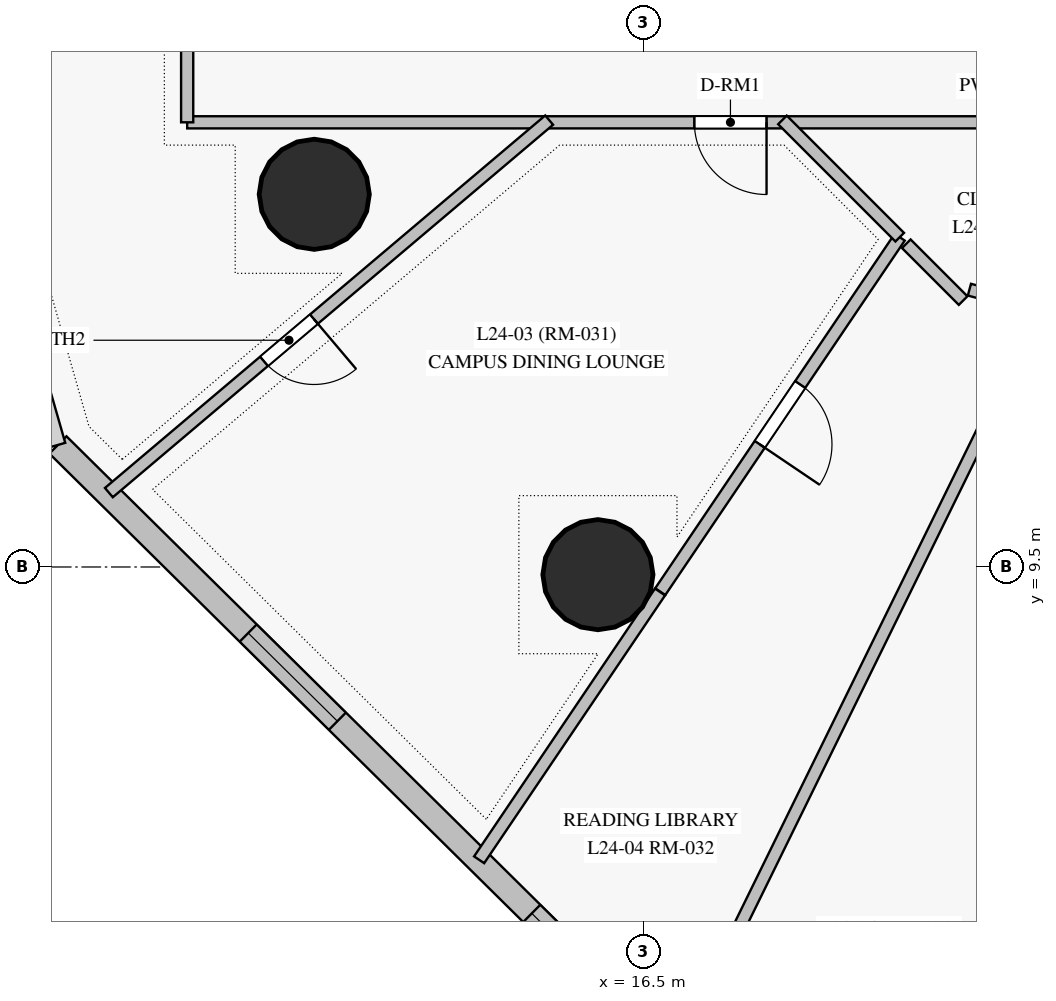
"""IFC4 building model, lengths in metres.
Left out: names, types, materials, properties, quantities, classifications, styles, units other than length and angle.
Written with IfcOpenShell. Run it as: python <this file> out.ifc"""

import sys

from ifc_helpers import new_model, si_unit, direction, frame, frame_2d, origin, origin_with_axes, origin_2d, place, context, subcontext, project, spatial, rectangle, circle, extrude, source, transform, mapped, element, fill, save


model = new_model("IFC4")
c1 = context("Model", 3, precision=1e-05, world=origin(), true_north=direction((0.0, 1.0)))
c2 = subcontext(c1, "Body", "Model", "MODEL_VIEW")
j1 = project(units=[si_unit("LENGTHUNIT", "METRE"), si_unit("PLANEANGLEUNIT", "RADIAN")], contexts=[c1])
p1 = place(None, origin())
s1 = spatial("IfcSite", under=j1, at=p1, CompositionType="ELEMENT")
p2 = place(p1, origin())
s2 = spatial("IfcBuilding", under=s1, at=p2, CompositionType="ELEMENT")
p3 = place(p2, frame((0.0, 0.0, 92.2)))
s3 = spatial("IfcBuildingStorey", under=s2, at=p3, CompositionType="ELEMENT", Elevation=92.2)
m1 = source(origin_with_axes(), c2, "Body", "SweptSolid", [
    extrude(circle(Radius=0.725, at=origin_2d()), origin(), (0.0, 0.0, 1.0), 4.0),
])
for number, where, z_axis, x_axis in (
    (1, (12.172, 14.403, 0.0), (0.0, 0.0, 1.0), (1.0, 0.0, 0.0)),
    (2, (15.904, 9.399, 0.0), (0.0, 0.0, 1.0), (1.0, 0.0, 0.0)),
):
    element("IfcColumn", number, at=place(p3, frame(where, z_axis=z_axis, x_axis=x_axis)), inside=s3, PredefinedType="COLUMN", context=c2, shape_type="MappedRepresentation", body=[
        mapped(m1, transform((0.0, 0.0, 0.0), scale=1.0)),
    ])
p4 = place(p3, frame((8.8, 11.106, 0.0), z_axis=(0.0, 0.0, 1.0), x_axis=(0.711166138023, -0.703023985459, 0.0)))
e3 = element("IfcWall", 3, at=p4, inside=s3, PredefinedType="SOLIDWALL", context=c2, shape_type="SweptSolid", body=[
    extrude(rectangle(XDim=12.474, YDim=0.32, at=frame_2d((6.237, 0.0))), origin(), (0.0, 0.0, 1.0), 3.775),
])
p5 = place(p4, frame((3.52, 0.0, 0.85)))
e4 = element("IfcOpeningElement", 4, at=p5, cuts=e3, PredefinedType="OPENING", context=c2, shape_type="SweptSolid", body=[
    extrude(rectangle(XDim=1.65, YDim=1.65, at=frame_2d((0.825, 0.825))), frame((0.0, 0.17, 0.0), z_axis=(0.0, -1.0, 0.0), x_axis=(1.0, 0.0, 0.0)), (0.0, 0.0, 1.0), 0.34),
])
p6 = place(p4, frame((8.766, 0.0, 0.85)))
e5 = element("IfcOpeningElement", 5, at=p6, cuts=e3, PredefinedType="OPENING", context=c2, shape_type="SweptSolid", body=[
    extrude(rectangle(XDim=1.65, YDim=1.65, at=frame_2d((0.825, 0.825))), frame((0.0, 0.17, 0.0), z_axis=(0.0, -1.0, 0.0), x_axis=(1.0, 0.0, 0.0)), (0.0, 0.0, 1.0), 0.34),
])
p7 = place(p3, frame((40.25, 15.35, 0.0), z_axis=(0.0, 0.0, 1.0), x_axis=(-1.0, 0.0, 0.0)))
e6 = element("IfcWall", 6, at=p7, inside=s3, PredefinedType="PARTITIONING", context=c2, shape_type="SweptSolid", body=[
    extrude(rectangle(XDim=29.75, YDim=0.16, at=frame_2d((14.875, 0.0))), origin(), (0.0, 0.0, 1.0), 2.975),
])
p8 = place(p7, frame((22.127, 0.0, 0.0)))
e7 = element("IfcOpeningElement", 7, at=p8, cuts=e6, PredefinedType="OPENING", context=c2, shape_type="SweptSolid", body=[
    extrude(rectangle(XDim=0.95, YDim=2.15, at=frame_2d((0.475, 1.075))), frame((0.0, 0.09, 0.0), z_axis=(0.0, -1.0, 0.0), x_axis=(1.0, 0.0, 0.0)), (0.0, 0.0, 1.0), 0.18),
])
p9 = place(p7, frame((14.4, 0.0, 0.0)))
e8 = element("IfcOpeningElement", 8, at=p9, cuts=e6, PredefinedType="OPENING", context=c2, shape_type="SweptSolid", body=[
    extrude(rectangle(XDim=0.96, YDim=2.15, at=frame_2d((0.48, 1.075))), frame((0.0, 0.09, 0.0), z_axis=(0.0, -1.0, 0.0), x_axis=(1.0, 0.0, 0.0)), (0.0, 0.0, 1.0), 0.18),
])
p10 = place(p7, frame((10.177, 0.0, 0.0)))
e9 = element("IfcOpeningElement", 9, at=p10, cuts=e6, PredefinedType="OPENING", context=c2, shape_type="SweptSolid", body=[
    extrude(rectangle(XDim=0.96, YDim=2.15, at=frame_2d((0.48, 1.075))), frame((0.0, 0.09, 0.0), z_axis=(0.0, -1.0, 0.0), x_axis=(1.0, 0.0, 0.0)), (0.0, 0.0, 1.0), 0.18),
])
p11 = place(p7, frame((8.254, 0.0, 0.0)))
e10 = element("IfcOpeningElement", 10, at=p11, cuts=e6, PredefinedType="OPENING", context=c2, shape_type="SweptSolid", body=[
    extrude(rectangle(XDim=0.95, YDim=2.15, at=frame_2d((0.475, 1.075))), frame((0.0, 0.09, 0.0), z_axis=(0.0, -1.0, 0.0), x_axis=(1.0, 0.0, 0.0)), (0.0, 0.0, 1.0), 0.18),
])
p12 = place(p7, frame((3.417, 0.0, 0.0)))
e11 = element("IfcOpeningElement", 11, at=p12, cuts=e6, PredefinedType="OPENING", context=c2, shape_type="SweptSolid", body=[
    extrude(rectangle(XDim=0.96, YDim=2.15, at=frame_2d((0.48, 1.075))), frame((0.0, 0.09, 0.0), z_axis=(0.0, -1.0, 0.0), x_axis=(1.0, 0.0, 0.0)), (0.0, 0.0, 1.0), 0.18),
])
p13 = place(p3, frame((10.5, 15.35, 0.0), z_axis=(0.0, 0.0, 1.0), x_axis=(0.0, 1.0, 0.0)))
e12 = element("IfcWall", 12, at=p13, inside=s3, PredefinedType="PARTITIONING", context=c2, shape_type="SweptSolid", body=[
    extrude(rectangle(XDim=16.651, YDim=0.16, at=frame_2d((8.326, 0.0))), origin(), (0.0, 0.0, 1.0), 3.445),
])
p14 = place(p13, frame((11.519, 0.0, 0.0)))
e13 = element("IfcOpeningElement", 13, at=p14, cuts=e12, PredefinedType="OPENING", context=c2, shape_type="SweptSolid", body=[
    extrude(rectangle(XDim=0.95, YDim=2.15, at=frame_2d((0.475, 1.075))), frame((0.0, 0.09, 0.0), z_axis=(0.0, -1.0, 0.0), x_axis=(1.0, 0.0, 0.0)), (0.0, 0.0, 1.0), 0.18),
])
p15 = place(p13, frame((12.642, 0.0, 0.0)))
e14 = element("IfcOpeningElement", 14, at=p15, cuts=e12, PredefinedType="OPENING", context=c2, shape_type="SweptSolid", body=[
    extrude(rectangle(XDim=0.96, YDim=2.15, at=frame_2d((0.48, 1.075))), frame((0.0, 0.09, 0.0), z_axis=(0.0, -1.0, 0.0), x_axis=(1.0, 0.0, 0.0)), (0.0, 0.0, 1.0), 0.18),
])
p16 = place(p3, frame((21.681, 12.744, 0.0), z_axis=(0.0, 0.0, 1.0), x_axis=(-0.440615293115, -0.897696030666, 0.0)))
e15 = element("IfcWall", 15, at=p16, inside=s3, PredefinedType="PARTITIONING", context=c2, shape_type="SweptSolid", body=[
    extrude(rectangle(XDim=10.75, YDim=0.16, at=frame_2d((5.375, 0.0))), origin(), (0.0, 0.0, 1.0), 3.775),
])
p17 = place(p3, frame((15.262, 15.379, 0.0), z_axis=(0.0, 0.0, 1.0), x_axis=(-0.763431442255, -0.645888870454, 0.0)))
e16 = element("IfcWall", 16, at=p17, inside=s3, PredefinedType="PARTITIONING", context=c2, shape_type="SweptSolid", body=[
    extrude(rectangle(XDim=7.587, YDim=0.16, at=frame_2d((3.794, 0.0))), origin(), (0.0, 0.0, 1.0), 2.975),
])
p18 = place(p17, frame((4.054, 0.0, 0.0)))
e17 = element("IfcOpeningElement", 17, at=p18, cuts=e16, PredefinedType="OPENING", context=c2, shape_type="SweptSolid", body=[
    extrude(rectangle(XDim=0.86, YDim=2.04, at=frame_2d((0.43, 1.02))), frame((0.0, 0.09, 0.0), z_axis=(0.0, -1.0, 0.0), x_axis=(1.0, 0.0, 0.0)), (0.0, 0.0, 1.0), 0.18),
])
p19 = place(p3, frame((27.907, 11.242, 0.0), z_axis=(0.0, 0.0, 1.0), x_axis=(-0.965920682586, 0.258838240899, 0.0)))
e18 = element("IfcWall", 18, at=p19, inside=s3, PredefinedType="PARTITIONING", context=c2, shape_type="SweptSolid", body=[
    extrude(rectangle(XDim=7.366, YDim=0.16, at=frame_2d((3.683, 0.0))), origin(), (0.0, 0.0, 1.0), 3.275),
])
p20 = place(p19, frame((4.313, 0.0, 0.0)))
e19 = element("IfcOpeningElement", 19, at=p20, cuts=e18, PredefinedType="OPENING", context=c2, shape_type="SweptSolid", body=[
    extrude(rectangle(XDim=0.96, YDim=2.15, at=frame_2d((0.48, 1.075))), frame((0.0, 0.09, 0.0), z_axis=(0.0, -1.0, 0.0), x_axis=(1.0, 0.0, 0.0)), (0.0, 0.0, 1.0), 0.18),
])
p21 = place(p19, frame((3.018, 0.0, 0.0)))
e20 = element("IfcOpeningElement", 20, at=p21, cuts=e18, PredefinedType="OPENING", context=c2, shape_type="SweptSolid", body=[
    extrude(rectangle(XDim=0.95, YDim=2.15, at=frame_2d((0.475, 1.075))), frame((0.0, 0.09, 0.0), z_axis=(0.0, -1.0, 0.0), x_axis=(1.0, 0.0, 0.0)), (0.0, 0.0, 1.0), 0.18),
])
p22 = place(p19, frame((1.763, 0.0, 0.0)))
e21 = element("IfcOpeningElement", 21, at=p22, cuts=e18, PredefinedType="OPENING", context=c2, shape_type="SweptSolid", body=[
    extrude(rectangle(XDim=0.96, YDim=2.15, at=frame_2d((0.48, 1.075))), frame((0.0, 0.09, 0.0), z_axis=(0.0, -1.0, 0.0), x_axis=(1.0, 0.0, 0.0)), (0.0, 0.0, 1.0), 0.18),
])
p23 = place(p3, frame((19.875, 13.839, 0.0), z_axis=(0.0, 0.0, 1.0), x_axis=(-0.559775304188, -0.82864444053, 0.0)))
e22 = element("IfcWall", 22, at=p23, inside=s3, PredefinedType="PARTITIONING", context=c2, shape_type="SweptSolid", body=[
    extrude(rectangle(XDim=5.628, YDim=0.16, at=frame_2d((2.814, 0.0))), origin(), (0.0, 0.0, 1.0), 3.775),
])
p24 = place(p23, frame((2.339, 0.0, 0.0)))
e23 = element("IfcOpeningElement", 23, at=p24, cuts=e22, PredefinedType="OPENING", context=c2, shape_type="SweptSolid", body=[
    extrude(rectangle(XDim=0.95, YDim=2.15, at=frame_2d((0.475, 1.075))), frame((0.0, 0.09, 0.0), z_axis=(0.0, -1.0, 0.0), x_axis=(1.0, 0.0, 0.0)), (0.0, 0.0, 1.0), 0.18),
])
p25 = place(p3, frame((16.721, 9.171, 0.0), z_axis=(0.0, 0.0, 1.0), x_axis=(-0.559791350137, -0.828633600762, 0.0)))
e24 = element("IfcWall", 24, at=p25, inside=s3, PredefinedType="PARTITIONING", context=c2, shape_type="SweptSolid", body=[
    extrude(rectangle(XDim=4.252, YDim=0.16, at=frame_2d((2.126, 0.0))), origin(), (0.0, 0.0, 1.0), 3.775),
])
p26 = place(p3, frame((18.332, 15.382, 0.0), z_axis=(0.0, 0.0, 1.0), x_axis=(0.707050832555, -0.707162725391, 0.0)))
e25 = element("IfcWall", 25, at=p26, inside=s3, PredefinedType="PARTITIONING", context=c2, shape_type="SweptSolid", body=[
    extrude(rectangle(XDim=2.182, YDim=0.16, at=frame_2d((1.091, 0.0))), origin(), (0.0, 0.0, 1.0), 3.275),
])
p27 = place(p3, frame((19.961, 13.752, 0.0), z_axis=(0.0, 0.0, 1.0), x_axis=(0.707106781187, -0.707106781187, 0.0)))
e26 = element("IfcWall", 26, at=p27, inside=s3, PredefinedType="PARTITIONING", context=c2, shape_type="SweptSolid", body=[
    extrude(rectangle(XDim=1.057, YDim=0.16, at=frame_2d((0.529, 0.0))), origin(), (0.0, 0.0, 1.0), 3.275),
])
m2 = source(origin_with_axes(), c2, "Body", "SweptSolid", [
    extrude(rectangle(XDim=1.65, YDim=1.65, at=frame_2d((0.825, 0.825))), frame((0.0, 0.03, 0.0), z_axis=(0.0, -1.0, 0.0), x_axis=(1.0, 0.0, 0.0)), (0.0, 0.0, 1.0), 0.06),
])
p28 = place(p5, origin())
e27 = element("IfcWindow", 27, at=p28, inside=s3, PartitioningType="SINGLE_PANEL", PredefinedType="WINDOW", context=c2, shape_type="MappedRepresentation", body=[
    mapped(m2, transform((0.0, 0.0, 0.0), scale=1.0)),
])
fill(e4, e27)
p29 = place(p6, origin())
e28 = element("IfcWindow", 28, at=p29, inside=s3, PartitioningType="SINGLE_PANEL", PredefinedType="WINDOW", context=c2, shape_type="MappedRepresentation", body=[
    mapped(m2, transform((0.0, 0.0, 0.0), scale=1.0)),
])
fill(e5, e28)
m3 = source(origin_with_axes(), c2, "Body", "SweptSolid", [
    extrude(rectangle(XDim=0.95, YDim=2.15, at=frame_2d((0.475, 1.075))), frame((0.0, 0.025, 0.0), z_axis=(0.0, -1.0, 0.0), x_axis=(1.0, 0.0, 0.0)), (0.0, 0.0, 1.0), 0.05),
])
p30 = place(p8, origin())
e29 = element("IfcDoor", 29, at=p30, inside=s3, OperationType="SINGLE_SWING_LEFT", PredefinedType="DOOR", context=c2, shape_type="MappedRepresentation", body=[
    mapped(m3, transform((0.0, 0.0, 0.0), scale=1.0)),
])
fill(e7, e29)
p31 = place(p24, origin())
e30 = element("IfcDoor", 30, at=p31, inside=s3, OperationType="SINGLE_SWING_RIGHT", PredefinedType="DOOR", context=c2, shape_type="MappedRepresentation", body=[
    mapped(m3, transform((0.0, 0.0, 0.0), scale=1.0)),
])
fill(e23, e30)
m4 = source(origin_with_axes(), c2, "Body", "SweptSolid", [
    extrude(rectangle(XDim=0.86, YDim=2.04, at=frame_2d((0.43, 1.02))), frame((0.0, 0.025, 0.0), z_axis=(0.0, -1.0, 0.0), x_axis=(1.0, 0.0, 0.0)), (0.0, 0.0, 1.0), 0.05),
])
p32 = place(p18, origin())
e31 = element("IfcDoor", 31, at=p32, inside=s3, OperationType="SINGLE_SWING_LEFT", PredefinedType="DOOR", context=c2, shape_type="MappedRepresentation", body=[
    mapped(m4, transform((0.0, 0.0, 0.0), scale=1.0)),
])
fill(e17, e31)
save(model, sys.argv[1])
